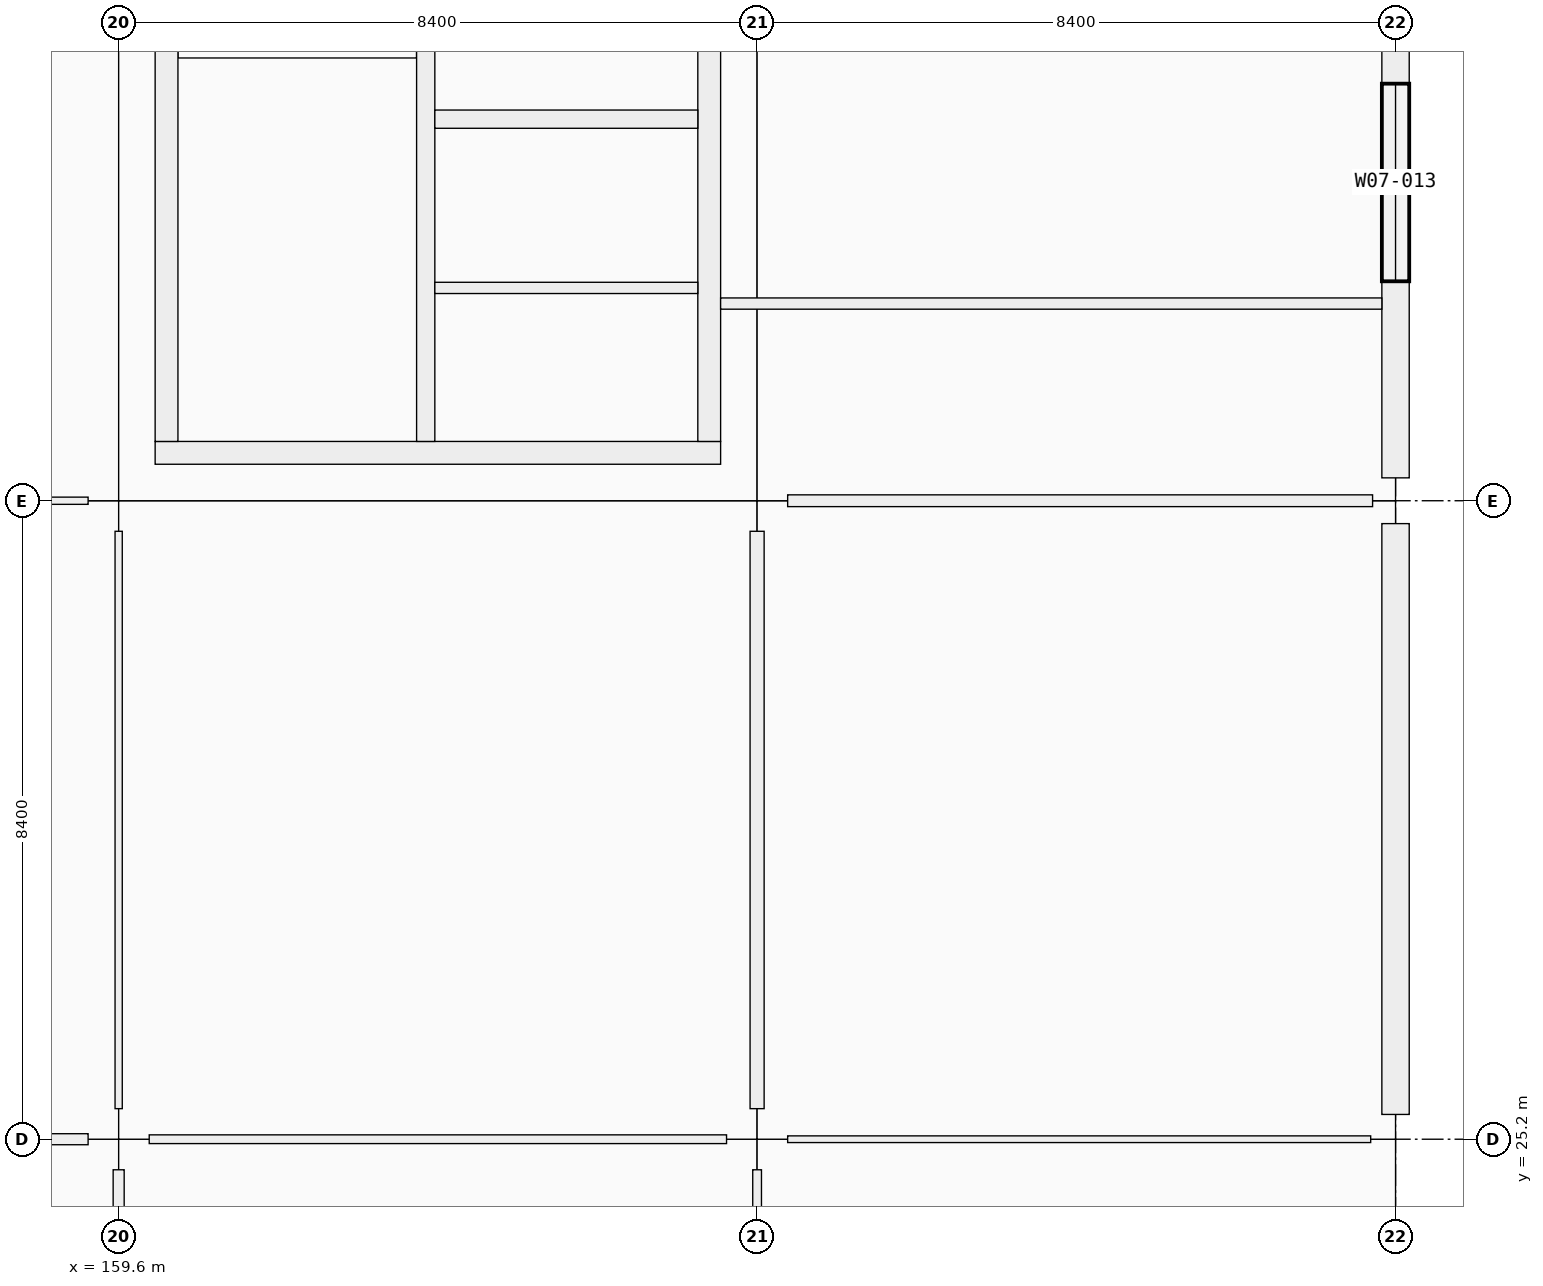
"""IFC4 building model, lengths in metres.
Left out: names, types, materials, properties, quantities, classifications, styles, units other than length and angle.
Written with IfcOpenShell. Run it as: python <this file> out.ifc"""

import sys

from ifc_helpers import new_model, si_unit, direction, frame, frame_2d, origin, origin_2d, place, context, subcontext, project, spatial, rectangle, extrude, element, fill, save


model = new_model("IFC4")
c1 = context("Model", 3, precision=1e-05, world=origin(), true_north=direction((0.0, 1.0)))
c2 = subcontext(c1, "Body", "Model", "MODEL_VIEW")
j1 = project(units=[si_unit("LENGTHUNIT", "METRE"), si_unit("PLANEANGLEUNIT", "RADIAN")], contexts=[c1])
p1 = place(None, origin())
s1 = spatial("IfcSite", under=j1, at=p1, CompositionType="ELEMENT")
p2 = place(p1, origin())
s2 = spatial("IfcBuilding", under=s1, at=p2, CompositionType="ELEMENT")
p3 = place(p2, origin())
s3 = spatial("IfcBuildingStorey", under=s2, at=p3, CompositionType="ELEMENT", Elevation=0.0)
for number, where, z_axis, x_axis in (
    (1, (159.6, 25.2, 0.0), (0.0, 0.0, 1.0), (1.0, 0.0, 0.0)),
    (2, (159.6, 33.6, 0.0), (0.0, 0.0, 1.0), (1.0, 0.0, 0.0)),
    (3, (168.0, 25.2, 0.0), (0.0, 0.0, 1.0), (1.0, 0.0, 0.0)),
    (4, (168.0, 33.6, 0.0), (0.0, 0.0, 1.0), (1.0, 0.0, 0.0)),
):
    element("IfcColumn", number, at=place(p3, frame(where, z_axis=z_axis, x_axis=x_axis)), inside=s3, PredefinedType="COLUMN", context=c2, shape_type="SweptSolid", body=[
        extrude(rectangle(XDim=0.8, YDim=0.8, at=origin_2d()), origin(), (0.0, 0.0, 1.0), 5.76),
    ])
p4 = place(p3, frame((176.4, 25.2, 0.0), z_axis=(0.0, 0.0, 1.0), x_axis=(1.0, 0.0, 0.0)))
e5 = element("IfcColumn", 5, at=p4, inside=s3, PredefinedType="COLUMN", context=c2, shape_type="SweptSolid", body=[
    extrude(rectangle(XDim=0.65, YDim=0.65, at=origin_2d()), origin(), (0.0, 0.0, 1.0), 5.76),
])
p5 = place(p3, frame((176.4, 33.6, 0.0), z_axis=(0.0, 0.0, 1.0), x_axis=(1.0, 0.0, 0.0)))
e6 = element("IfcColumn", 6, at=p5, inside=s3, PredefinedType="COLUMN", context=c2, shape_type="SweptSolid", body=[
    extrude(rectangle(XDim=0.6, YDim=0.6, at=origin_2d()), origin(), (0.0, 0.0, 1.0), 5.76),
])
p6 = place(p3, frame((176.4, 33.299, 0.0), z_axis=(0.0, 0.0, 1.0), x_axis=(0.0, -1.0, 0.0)))
e7 = element("IfcWall", 7, at=p6, inside=s3, PredefinedType="SOLIDWALL", context=c2, shape_type="SweptSolid", body=[
    extrude(rectangle(XDim=7.773, YDim=0.36, at=frame_2d((3.887, 0.0))), origin(), (0.0, 0.0, 1.0), 4.7),
])
p7 = place(p6, frame((2.837, 0.0, 0.0)))
e8 = element("IfcOpeningElement", 8, at=p7, cuts=e7, PredefinedType="OPENING", context=c2, shape_type="SweptSolid", body=[
    extrude(rectangle(XDim=2.1, YDim=2.25, at=frame_2d((1.05, 1.125))), frame((0.0, 0.18, 0.0), z_axis=(0.0, -1.0, 0.0), x_axis=(1.0, 0.0, 0.0)), (0.0, 0.0, 1.0), 0.36),
])
p8 = place(p3, frame((176.4, 41.674, 0.0), z_axis=(0.0, 0.0, 1.0), x_axis=(0.0, -1.0, 0.0)))
e9 = element("IfcWall", 9, at=p8, inside=s3, PredefinedType="SOLIDWALL", context=c2, shape_type="SweptSolid", body=[
    extrude(rectangle(XDim=7.773, YDim=0.36, at=frame_2d((3.887, 0.0))), origin(), (0.0, 0.0, 1.0), 4.7),
])
p9 = place(p8, frame((2.587, 0.0, 0.9)))
e10 = element("IfcOpeningElement", 10, at=p9, cuts=e9, PredefinedType="OPENING", context=c2, shape_type="SweptSolid", body=[
    extrude(rectangle(XDim=2.6, YDim=2.1, at=frame_2d((1.3, 1.05))), frame((0.0, 0.18, 0.0), z_axis=(0.0, -1.0, 0.0), x_axis=(1.0, 0.0, 0.0)), (0.0, 0.0, 1.0), 0.36),
])
p10 = place(p8, frame((5.624, 0.0, 0.0)))
e11 = element("IfcOpeningElement", 11, at=p10, cuts=e9, PredefinedType="OPENING", context=c2, shape_type="SweptSolid", body=[
    extrude(rectangle(XDim=2.0, YDim=2.25, at=frame_2d((1.0, 1.125))), frame((0.0, 0.18, 0.0), z_axis=(0.0, -1.0, 0.0), x_axis=(1.0, 0.0, 0.0)), (0.0, 0.0, 1.0), 0.36),
])
p11 = place(p3, frame((167.52, 34.23, 0.0), z_axis=(0.0, 0.0, 1.0), x_axis=(-1.0, 0.0, 0.0)))
e12 = element("IfcWall", 12, at=p11, inside=s3, PredefinedType="SHEAR", context=c2, shape_type="SweptSolid", body=[
    extrude(rectangle(XDim=7.44, YDim=0.3, at=frame_2d((3.72, 0.0))), origin(), (0.0, 0.0, 1.0), 5.76),
])
p12 = place(p11, frame((1.28, 0.0, 0.0)))
e13 = element("IfcOpeningElement", 13, at=p12, cuts=e12, PredefinedType="OPENING", context=c2, shape_type="SweptSolid", body=[
    extrude(rectangle(XDim=1.5, YDim=2.15, at=frame_2d((0.75, 1.075))), frame((0.0, 0.15, 0.0), z_axis=(0.0, -1.0, 0.0), x_axis=(1.0, 0.0, 0.0)), (0.0, 0.0, 1.0), 0.3),
])
p13 = place(p3, frame((160.23, 34.38, 0.0), z_axis=(0.0, 0.0, 1.0), x_axis=(0.0, 1.0, 0.0)))
e14 = element("IfcWall", 14, at=p13, inside=s3, PredefinedType="SHEAR", context=c2, shape_type="SweptSolid", body=[
    extrude(rectangle(XDim=6.84, YDim=0.3, at=frame_2d((3.42, 0.0))), origin(), (0.0, 0.0, 1.0), 5.76),
])
p14 = place(p3, frame((167.37, 41.22, 0.0), z_axis=(0.0, 0.0, 1.0), x_axis=(0.0, -1.0, 0.0)))
e15 = element("IfcWall", 15, at=p14, inside=s3, PredefinedType="SHEAR", context=c2, shape_type="SweptSolid", body=[
    extrude(rectangle(XDim=6.84, YDim=0.3, at=frame_2d((3.42, 0.0))), origin(), (0.0, 0.0, 1.0), 5.76),
])
p15 = place(p14, frame((5.12, 0.0, 0.0)))
e16 = element("IfcOpeningElement", 16, at=p15, cuts=e15, PredefinedType="OPENING", context=c2, shape_type="SweptSolid", body=[
    extrude(rectangle(XDim=1.5, YDim=2.15, at=frame_2d((0.75, 1.075))), frame((0.0, 0.15, 0.0), z_axis=(0.0, -1.0, 0.0), x_axis=(1.0, 0.0, 0.0)), (0.0, 0.0, 1.0), 0.3),
])
p16 = place(p3, frame((163.64, 34.38, 0.0), z_axis=(0.0, 0.0, 1.0), x_axis=(0.0, 1.0, 0.0)))
e17 = element("IfcWall", 17, at=p16, inside=s3, PredefinedType="SHEAR", context=c2, shape_type="SweptSolid", body=[
    extrude(rectangle(XDim=6.84, YDim=0.24, at=frame_2d((3.42, 0.0))), origin(), (0.0, 0.0, 1.0), 5.76),
])
p17 = place(p16, frame((0.12, 0.0, 0.0)))
e18 = element("IfcOpeningElement", 18, at=p17, cuts=e17, PredefinedType="OPENING", context=c2, shape_type="SweptSolid", body=[
    extrude(rectangle(XDim=1.0, YDim=2.15, at=frame_2d((0.5, 1.075))), frame((0.0, 0.12, 0.0), z_axis=(0.0, -1.0, 0.0), x_axis=(1.0, 0.0, 0.0)), (0.0, 0.0, 1.0), 0.24),
])
p18 = place(p3, frame((163.76, 38.62, 0.0), z_axis=(0.0, 0.0, 1.0), x_axis=(1.0, 0.0, 0.0)))
e19 = element("IfcWall", 19, at=p18, inside=s3, PredefinedType="SHEAR", context=c2, shape_type="SweptSolid", body=[
    extrude(rectangle(XDim=3.46, YDim=0.24, at=frame_2d((1.73, 0.0))), origin(), (0.0, 0.0, 1.0), 5.76),
])
p19 = place(p18, frame((1.08, 0.0, 0.0)))
e20 = element("IfcOpeningElement", 20, at=p19, cuts=e19, PredefinedType="OPENING", context=c2, shape_type="SweptSolid", body=[
    extrude(rectangle(XDim=1.3, YDim=2.25, at=frame_2d((0.65, 1.125))), frame((0.0, 0.12, 0.0), z_axis=(0.0, -1.0, 0.0), x_axis=(1.0, 0.0, 0.0)), (0.0, 0.0, 1.0), 0.24),
])
p20 = place(p3, frame((167.22, 36.4, 0.0), z_axis=(0.0, 0.0, 1.0), x_axis=(-1.0, 0.0, 0.0)))
e21 = element("IfcWall", 21, at=p20, inside=s3, PredefinedType="PARTITIONING", context=c2, shape_type="SweptSolid", body=[
    extrude(rectangle(XDim=3.46, YDim=0.148, at=frame_2d((1.73, 0.0))), origin(), (0.0, 0.0, 1.0), 5.51),
])
p21 = place(p20, frame((0.98, 0.0, 0.0)))
e22 = element("IfcOpeningElement", 22, at=p21, cuts=e21, PredefinedType="OPENING", context=c2, shape_type="SweptSolid", body=[
    extrude(rectangle(XDim=1.5, YDim=2.15, at=frame_2d((0.75, 1.075))), frame((0.0, 0.074, 0.0), z_axis=(0.0, -1.0, 0.0), x_axis=(1.0, 0.0, 0.0)), (0.0, 0.0, 1.0), 0.148),
])
p22 = place(p3, frame((151.602, 25.2, 0.0), z_axis=(0.0, 0.0, 1.0), x_axis=(1.0, 0.0, 0.0)))
e23 = element("IfcWall", 23, at=p22, inside=s3, PredefinedType="PARTITIONING", context=c2, shape_type="SweptSolid", body=[
    extrude(rectangle(XDim=7.596, YDim=0.145, at=frame_2d((3.798, 0.0))), origin(), (0.0, 0.0, 1.0), 3.66),
])
p23 = place(p22, frame((3.278, 0.0, 0.0)))
e24 = element("IfcOpeningElement", 24, at=p23, cuts=e23, PredefinedType="OPENING", context=c2, shape_type="SweptSolid", body=[
    extrude(rectangle(XDim=1.04, YDim=2.2, at=frame_2d((0.52, 1.1))), frame((0.0, 0.073, 0.0), z_axis=(0.0, -1.0, 0.0), x_axis=(1.0, 0.0, 0.0)), (0.0, 0.0, 1.0), 0.145),
])
p24 = place(p3, frame((151.577, 33.6, 0.0), z_axis=(0.0, 0.0, 1.0), x_axis=(1.0, 0.0, 0.0)))
e25 = element("IfcWall", 25, at=p24, inside=s3, PredefinedType="PARTITIONING", context=c2, shape_type="SweptSolid", body=[
    extrude(rectangle(XDim=7.621, YDim=0.095, at=frame_2d((3.811, 0.0))), origin(), (0.0, 0.0, 1.0), 3.66),
])
p25 = place(p24, frame((3.311, 0.0, 0.0)))
e26 = element("IfcOpeningElement", 26, at=p25, cuts=e25, PredefinedType="OPENING", context=c2, shape_type="SweptSolid", body=[
    extrude(rectangle(XDim=1.0, YDim=2.2, at=frame_2d((0.5, 1.1))), frame((0.0, 0.047, 0.0), z_axis=(0.0, -1.0, 0.0), x_axis=(1.0, 0.0, 0.0)), (0.0, 0.0, 1.0), 0.095),
])
p26 = place(p3, frame((160.002, 25.2, 0.0), z_axis=(0.0, 0.0, 1.0), x_axis=(1.0, 0.0, 0.0)))
e27 = element("IfcWall", 27, at=p26, inside=s3, PredefinedType="PARTITIONING", context=c2, shape_type="SweptSolid", body=[
    extrude(rectangle(XDim=7.596, YDim=0.115, at=frame_2d((3.798, 0.0))), origin(), (0.0, 0.0, 1.0), 3.66),
])
p27 = place(p26, frame((3.268, 0.0, 0.0)))
e28 = element("IfcOpeningElement", 28, at=p27, cuts=e27, PredefinedType="OPENING", context=c2, shape_type="SweptSolid", body=[
    extrude(rectangle(XDim=1.06, YDim=2.25, at=frame_2d((0.53, 1.125))), frame((0.0, 0.058, 0.0), z_axis=(0.0, -1.0, 0.0), x_axis=(1.0, 0.0, 0.0)), (0.0, 0.0, 1.0), 0.115),
])
p28 = place(p3, frame((168.402, 25.2, 0.0), z_axis=(0.0, 0.0, 1.0), x_axis=(1.0, 0.0, 0.0)))
e29 = element("IfcWall", 29, at=p28, inside=s3, PredefinedType="PARTITIONING", context=c2, shape_type="SweptSolid", body=[
    extrude(rectangle(XDim=7.671, YDim=0.088, at=frame_2d((3.835, 0.0))), origin(), (0.0, 0.0, 1.0), 3.66),
])
p29 = place(p28, frame((3.336, 0.0, 0.0)))
e30 = element("IfcOpeningElement", 30, at=p29, cuts=e29, PredefinedType="OPENING", context=c2, shape_type="SweptSolid", body=[
    extrude(rectangle(XDim=1.0, YDim=2.2, at=frame_2d((0.5, 1.1))), frame((0.0, 0.044, 0.0), z_axis=(0.0, -1.0, 0.0), x_axis=(1.0, 0.0, 0.0)), (0.0, 0.0, 1.0), 0.088),
])
p30 = place(p3, frame((168.402, 33.6, 0.0), z_axis=(0.0, 0.0, 1.0), x_axis=(1.0, 0.0, 0.0)))
e31 = element("IfcWall", 31, at=p30, inside=s3, PredefinedType="PARTITIONING", context=c2, shape_type="SweptSolid", body=[
    extrude(rectangle(XDim=7.696, YDim=0.155, at=frame_2d((3.848, 0.0))), origin(), (0.0, 0.0, 1.0), 3.66),
])
p31 = place(p30, frame((3.383, 0.0, 0.0)))
e32 = element("IfcOpeningElement", 32, at=p31, cuts=e31, PredefinedType="OPENING", context=c2, shape_type="SweptSolid", body=[
    extrude(rectangle(XDim=0.93, YDim=2.12, at=frame_2d((0.465, 1.06))), frame((0.0, 0.078, 0.0), z_axis=(0.0, -1.0, 0.0), x_axis=(1.0, 0.0, 0.0)), (0.0, 0.0, 1.0), 0.155),
])
p32 = place(p3, frame((159.6, 17.202, 0.0), z_axis=(0.0, 0.0, 1.0), x_axis=(0.0, 1.0, 0.0)))
e33 = element("IfcWall", 33, at=p32, inside=s3, PredefinedType="PARTITIONING", context=c2, shape_type="SweptSolid", body=[
    extrude(rectangle(XDim=7.596, YDim=0.145, at=frame_2d((3.798, 0.0))), origin(), (0.0, 0.0, 1.0), 3.66),
])
p33 = place(p32, frame((3.273, 0.0, 0.0)))
e34 = element("IfcOpeningElement", 34, at=p33, cuts=e33, PredefinedType="OPENING", context=c2, shape_type="SweptSolid", body=[
    extrude(rectangle(XDim=1.05, YDim=2.12, at=frame_2d((0.525, 1.06))), frame((0.0, 0.073, 0.0), z_axis=(0.0, -1.0, 0.0), x_axis=(1.0, 0.0, 0.0)), (0.0, 0.0, 1.0), 0.145),
])
p34 = place(p3, frame((159.6, 25.602, 0.0), z_axis=(0.0, 0.0, 1.0), x_axis=(0.0, 1.0, 0.0)))
e35 = element("IfcWall", 35, at=p34, inside=s3, PredefinedType="PARTITIONING", context=c2, shape_type="SweptSolid", body=[
    extrude(rectangle(XDim=7.596, YDim=0.095, at=frame_2d((3.798, 0.0))), origin(), (0.0, 0.0, 1.0), 3.66),
])
p35 = place(p34, frame((3.328, 0.0, 0.0)))
e36 = element("IfcOpeningElement", 36, at=p35, cuts=e35, PredefinedType="OPENING", context=c2, shape_type="SweptSolid", body=[
    extrude(rectangle(XDim=0.94, YDim=2.15, at=frame_2d((0.47, 1.075))), frame((0.0, 0.047, 0.0), z_axis=(0.0, -1.0, 0.0), x_axis=(1.0, 0.0, 0.0)), (0.0, 0.0, 1.0), 0.095),
])
p36 = place(p3, frame((168.0, 17.202, 0.0), z_axis=(0.0, 0.0, 1.0), x_axis=(0.0, 1.0, 0.0)))
e37 = element("IfcWall", 37, at=p36, inside=s3, PredefinedType="PARTITIONING", context=c2, shape_type="SweptSolid", body=[
    extrude(rectangle(XDim=7.596, YDim=0.115, at=frame_2d((3.798, 0.0))), origin(), (0.0, 0.0, 1.0), 3.66),
])
p37 = place(p36, frame((3.333, 0.0, 0.0)))
e38 = element("IfcOpeningElement", 38, at=p37, cuts=e37, PredefinedType="OPENING", context=c2, shape_type="SweptSolid", body=[
    extrude(rectangle(XDim=0.93, YDim=2.12, at=frame_2d((0.465, 1.06))), frame((0.0, 0.058, 0.0), z_axis=(0.0, -1.0, 0.0), x_axis=(1.0, 0.0, 0.0)), (0.0, 0.0, 1.0), 0.115),
])
p38 = place(p3, frame((168.0, 25.602, 0.0), z_axis=(0.0, 0.0, 1.0), x_axis=(0.0, 1.0, 0.0)))
e39 = element("IfcWall", 39, at=p38, inside=s3, PredefinedType="PARTITIONING", context=c2, shape_type="SweptSolid", body=[
    extrude(rectangle(XDim=7.596, YDim=0.185, at=frame_2d((3.798, 0.0))), origin(), (0.0, 0.0, 1.0), 3.66),
])
p39 = place(p38, frame((3.293, 0.0, 0.0)))
e40 = element("IfcOpeningElement", 40, at=p39, cuts=e39, PredefinedType="OPENING", context=c2, shape_type="SweptSolid", body=[
    extrude(rectangle(XDim=1.01, YDim=2.12, at=frame_2d((0.505, 1.06))), frame((0.0, 0.093, 0.0), z_axis=(0.0, -1.0, 0.0), x_axis=(1.0, 0.0, 0.0)), (0.0, 0.0, 1.0), 0.185),
])
p40 = place(p3, frame((167.52, 36.194, 0.0), z_axis=(0.0, 0.0, 1.0), x_axis=(1.0, 0.0, 0.0)))
e41 = element("IfcWall", 41, at=p40, inside=s3, PredefinedType="PARTITIONING", context=c2, shape_type="SweptSolid", body=[
    extrude(rectangle(XDim=8.7, YDim=0.148, at=frame_2d((4.35, 0.0))), origin(), (0.0, 0.0, 1.0), 3.66),
])
p41 = place(p7, origin())
e42 = element("IfcDoor", 42, at=p41, inside=s3, OperationType="DOUBLE_DOOR_SINGLE_SWING", PredefinedType="DOOR", context=c2, shape_type="SweptSolid", body=[
    extrude(rectangle(XDim=2.1, YDim=2.25, at=frame_2d((1.05, 1.125))), frame((0.0, 0.025, 0.0), z_axis=(0.0, -1.0, 0.0), x_axis=(1.0, 0.0, 0.0)), (0.0, 0.0, 1.0), 0.05),
])
fill(e8, e42)
p42 = place(p9, origin())
e43 = element("IfcWindow", 43, at=p42, inside=s3, PartitioningType="SINGLE_PANEL", PredefinedType="WINDOW", context=c2, shape_type="SweptSolid", body=[
    extrude(rectangle(XDim=2.6, YDim=2.1, at=frame_2d((1.3, 1.05))), frame((0.0, 0.03, 0.0), z_axis=(0.0, -1.0, 0.0), x_axis=(1.0, 0.0, 0.0)), (0.0, 0.0, 1.0), 0.06),
])
fill(e10, e43)
p43 = place(p10, origin())
e44 = element("IfcDoor", 44, at=p43, inside=s3, OperationType="DOUBLE_DOOR_SINGLE_SWING", PredefinedType="DOOR", context=c2, shape_type="SweptSolid", body=[
    extrude(rectangle(XDim=2.0, YDim=2.25, at=frame_2d((1.0, 1.125))), frame((0.0, 0.025, 0.0), z_axis=(0.0, -1.0, 0.0), x_axis=(1.0, 0.0, 0.0)), (0.0, 0.0, 1.0), 0.05),
])
fill(e11, e44)
p44 = place(p17, origin())
e45 = element("IfcDoor", 45, at=p44, inside=s3, OperationType="SINGLE_SWING_RIGHT", PredefinedType="DOOR", context=c2, shape_type="SweptSolid", body=[
    extrude(rectangle(XDim=1.0, YDim=2.15, at=frame_2d((0.5, 1.075))), frame((0.0, 0.025, 0.0), z_axis=(0.0, -1.0, 0.0), x_axis=(1.0, 0.0, 0.0)), (0.0, 0.0, 1.0), 0.05),
])
fill(e18, e45)
p45 = place(p12, origin())
e46 = element("IfcDoor", 46, at=p45, inside=s3, OperationType="DOUBLE_DOOR_SINGLE_SWING", PredefinedType="DOOR", context=c2, shape_type="SweptSolid", body=[
    extrude(rectangle(XDim=1.5, YDim=2.15, at=frame_2d((0.75, 1.075))), frame((0.0, 0.025, 0.0), z_axis=(0.0, -1.0, 0.0), x_axis=(1.0, 0.0, 0.0)), (0.0, 0.0, 1.0), 0.05),
])
fill(e13, e46)
p46 = place(p15, origin())
e47 = element("IfcDoor", 47, at=p46, inside=s3, OperationType="DOUBLE_DOOR_SINGLE_SWING", PredefinedType="DOOR", context=c2, shape_type="SweptSolid", body=[
    extrude(rectangle(XDim=1.5, YDim=2.15, at=frame_2d((0.75, 1.075))), frame((0.0, 0.025, 0.0), z_axis=(0.0, -1.0, 0.0), x_axis=(1.0, 0.0, 0.0)), (0.0, 0.0, 1.0), 0.05),
])
fill(e16, e47)
p47 = place(p19, origin())
e48 = element("IfcDoor", 48, at=p47, inside=s3, OperationType="DOUBLE_DOOR_SLIDING", PredefinedType="DOOR", context=c2, shape_type="SweptSolid", body=[
    extrude(rectangle(XDim=1.3, YDim=2.25, at=frame_2d((0.65, 1.125))), frame((0.0, 0.025, 0.0), z_axis=(0.0, -1.0, 0.0), x_axis=(1.0, 0.0, 0.0)), (0.0, 0.0, 1.0), 0.05),
])
fill(e20, e48)
p48 = place(p21, origin())
e49 = element("IfcDoor", 49, at=p48, inside=s3, OperationType="DOUBLE_DOOR_SINGLE_SWING", PredefinedType="DOOR", context=c2, shape_type="SweptSolid", body=[
    extrude(rectangle(XDim=1.5, YDim=2.15, at=frame_2d((0.75, 1.075))), frame((0.0, 0.025, 0.0), z_axis=(0.0, -1.0, 0.0), x_axis=(1.0, 0.0, 0.0)), (0.0, 0.0, 1.0), 0.05),
])
fill(e22, e49)
p49 = place(p27, origin())
e50 = element("IfcDoor", 50, at=p49, inside=s3, OperationType="SINGLE_SWING_LEFT", PredefinedType="DOOR", context=c2, shape_type="SweptSolid", body=[
    extrude(rectangle(XDim=1.06, YDim=2.25, at=frame_2d((0.53, 1.125))), frame((0.0, 0.025, 0.0), z_axis=(0.0, -1.0, 0.0), x_axis=(1.0, 0.0, 0.0)), (0.0, 0.0, 1.0), 0.05),
])
fill(e28, e50)
p50 = place(p35, origin())
e51 = element("IfcDoor", 51, at=p50, inside=s3, OperationType="SINGLE_SWING_RIGHT", PredefinedType="DOOR", context=c2, shape_type="SweptSolid", body=[
    extrude(rectangle(XDim=0.94, YDim=2.15, at=frame_2d((0.47, 1.075))), frame((0.0, 0.025, 0.0), z_axis=(0.0, -1.0, 0.0), x_axis=(1.0, 0.0, 0.0)), (0.0, 0.0, 1.0), 0.05),
])
fill(e36, e51)
p51 = place(p39, origin())
e52 = element("IfcDoor", 52, at=p51, inside=s3, OperationType="SINGLE_SWING_LEFT", PredefinedType="DOOR", context=c2, shape_type="SweptSolid", body=[
    extrude(rectangle(XDim=1.01, YDim=2.12, at=frame_2d((0.505, 1.06))), frame((0.0, 0.025, 0.0), z_axis=(0.0, -1.0, 0.0), x_axis=(1.0, 0.0, 0.0)), (0.0, 0.0, 1.0), 0.05),
])
fill(e40, e52)
p52 = place(p31, origin())
e53 = element("IfcDoor", 53, at=p52, inside=s3, OperationType="SINGLE_SWING_LEFT", PredefinedType="DOOR", context=c2, shape_type="SweptSolid", body=[
    extrude(rectangle(XDim=0.93, YDim=2.12, at=frame_2d((0.465, 1.06))), frame((0.0, 0.025, 0.0), z_axis=(0.0, -1.0, 0.0), x_axis=(1.0, 0.0, 0.0)), (0.0, 0.0, 1.0), 0.05),
])
fill(e32, e53)
p53 = place(p29, origin())
e54 = element("IfcDoor", 54, at=p53, inside=s3, OperationType="SINGLE_SWING_LEFT", PredefinedType="DOOR", context=c2, shape_type="SweptSolid", body=[
    extrude(rectangle(XDim=1.0, YDim=2.2, at=frame_2d((0.5, 1.1))), frame((0.0, 0.025, 0.0), z_axis=(0.0, -1.0, 0.0), x_axis=(1.0, 0.0, 0.0)), (0.0, 0.0, 1.0), 0.05),
])
fill(e30, e54)
save(model, sys.argv[1])
